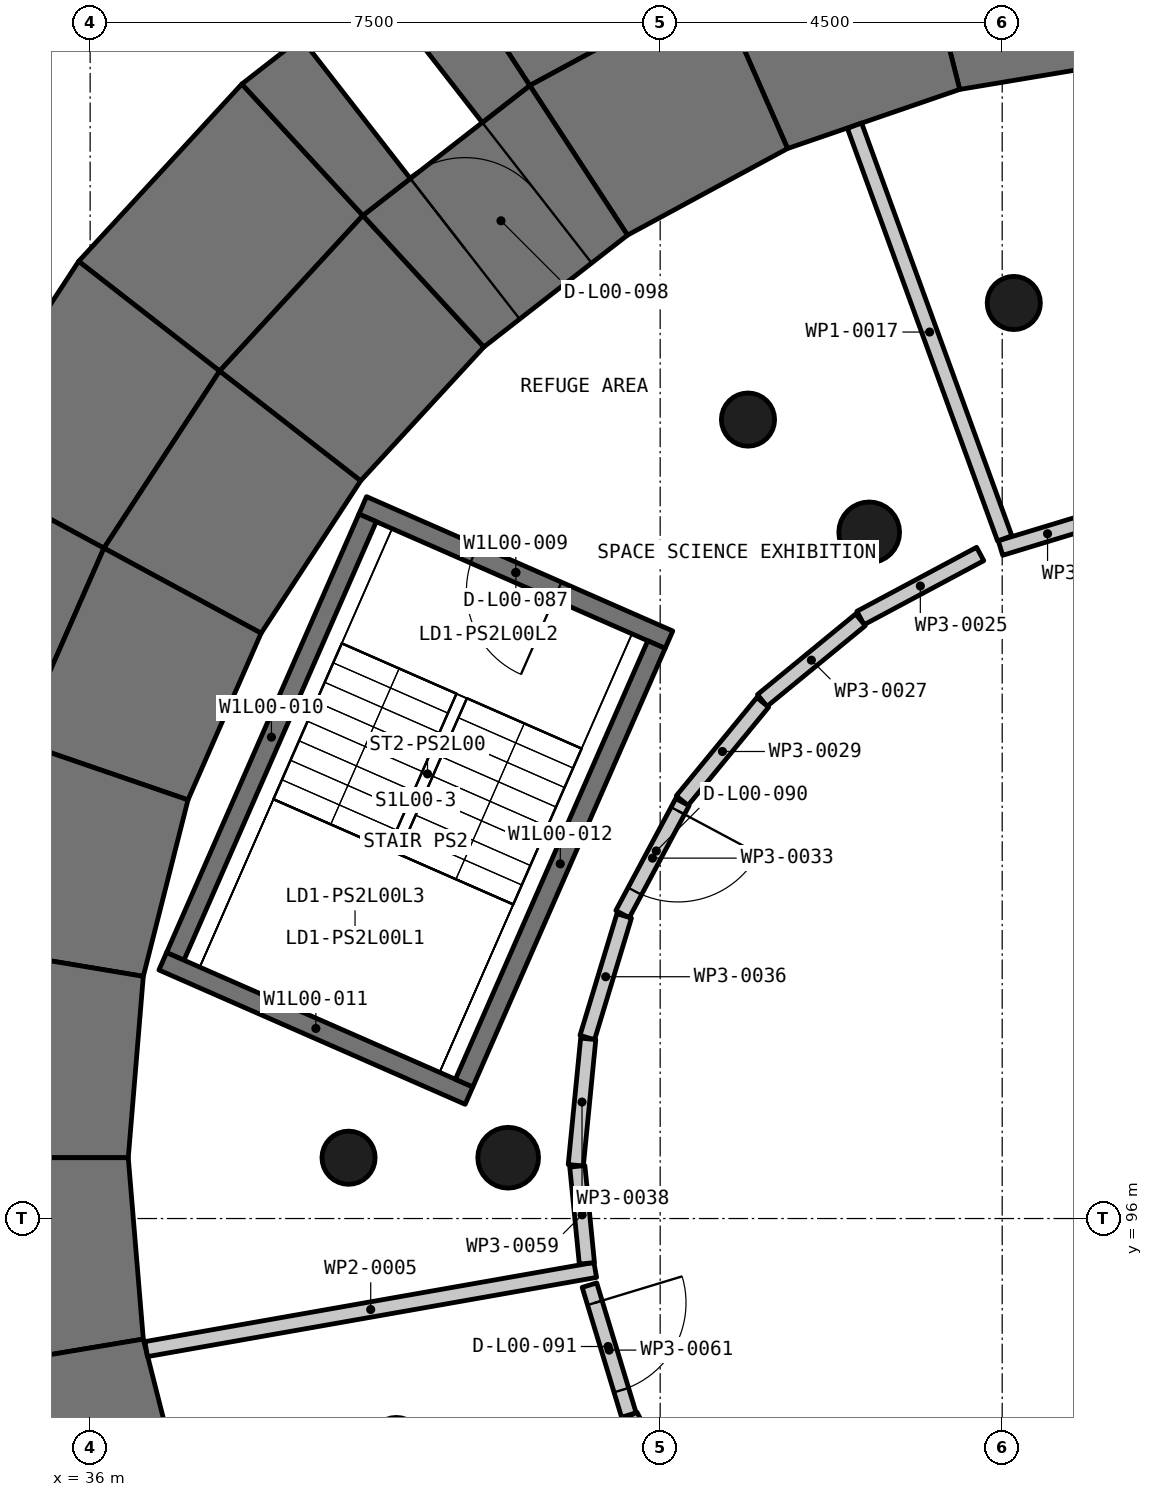
"""IFC4 building model, lengths in metres.
Left out: names, types, materials, properties, quantities, classifications, styles, units other than length and angle.
Written with IfcOpenShell. Run it as: python <this file> out.ifc"""

import sys

from ifc_helpers import new_model, si_unit, direction, frame, frame_2d, origin, origin_2d, place, context, subcontext, project, spatial, polyline, rectangle, circle, outline, extrude, element, fill, save


model = new_model("IFC4")
c1 = context("Model", 3, precision=1e-05, world=origin(), true_north=direction((0.0, 1.0)))
c2 = subcontext(c1, "Body", "Model", "MODEL_VIEW")
j1 = project(units=[si_unit("LENGTHUNIT", "METRE"), si_unit("PLANEANGLEUNIT", "RADIAN")], contexts=[c1])
p1 = place(None, origin())
s1 = spatial("IfcSite", under=j1, at=p1, CompositionType="ELEMENT")
p2 = place(p1, origin())
s2 = spatial("IfcBuilding", under=s1, at=p2, CompositionType="ELEMENT")
p3 = place(p2, origin())
s3 = spatial("IfcBuildingStorey", under=s2, at=p3, CompositionType="ELEMENT", Elevation=0.0)
for number, where, z_axis, x_axis in (
    (1, (46.25, 105.027, -0.2), (0.0, 0.0, 1.0), (1.0, 0.0, 0.0)),
    (2, (41.5, 96.8, -0.2), (0.0, 0.0, 1.0), (1.0, 0.0, 0.0)),
):
    element("IfcColumn", number, at=place(p3, frame(where, z_axis=z_axis, x_axis=x_axis)), inside=s3, PredefinedType="COLUMN", context=c2, shape_type="SweptSolid", body=[
        extrude(circle(Radius=0.4, at=origin_2d()), origin(), (0.0, 0.0, 1.0), 5.9),
    ])
for number, where, z_axis, x_axis in (
    (3, (48.152, 108.045, -0.2), (0.0, 0.0, 1.0), (1.0, 0.0, 0.0)),
    (4, (44.656, 106.511, -0.2), (0.0, 0.0, 1.0), (1.0, 0.0, 0.0)),
    (5, (39.4, 96.8, -0.2), (0.0, 0.0, 1.0), (1.0, 0.0, 0.0)),
    (6, (40.029, 93.033, -0.2), (0.0, 0.0, 1.0), (1.0, 0.0, 0.0)),
):
    element("IfcColumn", number, at=place(p3, frame(where, z_axis=z_axis, x_axis=x_axis)), inside=s3, PredefinedType="COLUMN", context=c2, shape_type="SweptSolid", body=[
        extrude(circle(Radius=0.35, at=origin_2d()), origin(), (0.0, 0.0, 1.0), 5.9),
    ])
p4 = place(p3, frame((43.845, 113.353, -0.2), z_axis=(0.0, 0.0, 1.0), x_axis=(-0.87946790064, -0.475958203778, 0.0)))
e7 = element("IfcWall", 7, at=p4, inside=s3, PredefinedType="SHEAR", context=c2, shape_type="SweptSolid", body=[
    extrude(outline(polyline([(0.0, -1.171), (3.171, -1.171), (2.977, 1.171), (0.194, 1.171), (0.0, -1.171)])), origin(), (0.0, 0.0, 1.0), 5.9),
])
p5 = place(p3, frame((38.858, 110.133, -0.2), z_axis=(0.0, 0.0, 1.0), x_axis=(-0.677243324002, -0.735759118254, 0.0)))
e8 = element("IfcWall", 8, at=p5, inside=s3, PredefinedType="SHEAR", context=c2, shape_type="SweptSolid", body=[
    extrude(outline(polyline([(0.0, -1.171), (3.171, -1.172), (2.977, 1.171), (0.194, 1.172), (0.0, -1.171)])), origin(), (0.0, 0.0, 1.0), 5.9),
])
p6 = place(p3, frame((36.829, 107.952, -0.2), z_axis=(0.0, 0.0, 1.0), x_axis=(-0.546965131946, -0.837155388464, 0.0)))
e9 = element("IfcWall", 9, at=p6, inside=s3, PredefinedType="SHEAR", context=c2, shape_type="SweptSolid", body=[
    extrude(outline(polyline([(0.0, -1.172), (3.171, -1.171), (2.977, 1.172), (0.194, 1.171), (0.0, -1.172)])), origin(), (0.0, 0.0, 1.0), 5.9),
])
p7 = place(p3, frame((35.187, 105.468, -0.2), z_axis=(0.0, 0.0, 1.0), x_axis=(-0.401683019395, -0.915778768006, 0.0)))
e10 = element("IfcWall", 10, at=p7, inside=s3, PredefinedType="SHEAR", context=c2, shape_type="SweptSolid", body=[
    extrude(outline(polyline([(-0.0, -1.171), (3.171, -1.171), (2.977, 1.171), (0.194, 1.171), (-0.0, -1.171)])), origin(), (0.0, 0.0, 1.0), 5.9),
])
p8 = place(p3, frame((49.802, 112.436, -0.2), z_axis=(0.0, 0.0, 1.0), x_axis=(-0.986348836235, -0.164669284498, 0.0)))
e11 = element("IfcWall", 11, at=p8, inside=s3, PredefinedType="SHEAR", context=c2, shape_type="SweptSolid", body=[
    extrude(outline(polyline([(0.0, -1.171), (2.783, -1.171), (2.589, 1.171), (0.194, 1.171), (0.0, -1.171)])), origin(), (0.0, 0.0, 1.0), 5.9),
])
p9 = place(p3, frame((47.244, 112.026, -0.2), z_axis=(0.0, 0.0, 1.0), x_axis=(-0.945820527965, -0.324689896485, 0.0)))
e12 = element("IfcWall", 12, at=p9, inside=s3, PredefinedType="SHEAR", context=c2, shape_type="SweptSolid", body=[
    extrude(outline(polyline([(0.0, -1.171), (2.783, -1.171), (2.589, 1.171), (0.194, 1.172), (0.0, -1.171)])), origin(), (0.0, 0.0, 1.0), 5.9),
])
p10 = place(p3, frame((44.789, 111.2, -0.2), z_axis=(0.0, 0.0, 1.0), x_axis=(-0.87946337705, -0.4759665623, 0.0)))
e13 = element("IfcWall", 13, at=p10, inside=s3, PredefinedType="SHEAR", context=c2, shape_type="SweptSolid", body=[
    extrude(outline(polyline([(0.0, -1.171), (2.783, -1.171), (2.589, 1.171), (0.194, 1.171), (0.0, -1.171)])), origin(), (0.0, 0.0, 1.0), 5.9),
])
p11 = place(p3, frame((40.45, 108.403, -0.2), z_axis=(0.0, 0.0, 1.0), x_axis=(-0.677288370304, -0.735717651991, 0.0)))
e14 = element("IfcWall", 14, at=p11, inside=s3, PredefinedType="SHEAR", context=c2, shape_type="SweptSolid", body=[
    extrude(outline(polyline([(0.0, -1.171), (2.783, -1.171), (2.588, 1.171), (0.194, 1.171), (0.0, -1.171)])), origin(), (0.0, 0.0, 1.0), 5.9),
])
p12 = place(p3, frame((38.684, 106.508, -0.2), z_axis=(0.0, 0.0, 1.0), x_axis=(-0.54694202516, -0.837170485095, 0.0)))
e15 = element("IfcWall", 15, at=p12, inside=s3, PredefinedType="SHEAR", context=c2, shape_type="SweptSolid", body=[
    extrude(outline(polyline([(0.0, -1.171), (2.783, -1.171), (2.589, 1.171), (0.194, 1.171), (0.0, -1.171)])), origin(), (0.0, 0.0, 1.0), 5.9),
])
p13 = place(p3, frame((37.254, 104.349, -0.2), z_axis=(0.0, 0.0, 1.0), x_axis=(-0.401729909484, -0.915758199431, 0.0)))
e16 = element("IfcWall", 16, at=p13, inside=s3, PredefinedType="SHEAR", context=c2, shape_type="SweptSolid", body=[
    extrude(outline(polyline([(0.0, -1.171), (2.783, -1.171), (2.588, 1.172), (0.194, 1.171), (0.0, -1.171)])), origin(), (0.0, 0.0, 1.0), 5.9),
])
p14 = place(p3, frame((36.199, 101.983, -0.2), z_axis=(0.0, 0.0, 1.0), x_axis=(-0.245548138537, -0.969384398297, 0.0)))
e17 = element("IfcWall", 17, at=p14, inside=s3, PredefinedType="SHEAR", context=c2, shape_type="SweptSolid", body=[
    extrude(outline(polyline([(0.0, -1.172), (2.783, -1.171), (2.589, 1.172), (0.194, 1.171), (0.0, -1.172)])), origin(), (0.0, 0.0, 1.0), 5.9),
])
p15 = place(p3, frame((35.548, 99.477, -0.2), z_axis=(0.0, 0.0, 1.0), x_axis=(-0.082558992404, -0.996586179301, 0.0)))
e18 = element("IfcWall", 18, at=p15, inside=s3, PredefinedType="SHEAR", context=c2, shape_type="SweptSolid", body=[
    extrude(outline(polyline([(0.0, -1.171), (2.783, -1.171), (2.589, 1.171), (0.194, 1.171), (0.0, -1.171)])), origin(), (0.0, 0.0, 1.0), 5.9),
])
p16 = place(p3, frame((35.318, 96.897, -0.2), z_axis=(0.0, 0.0, 1.0), x_axis=(0.082558992404, -0.996586179301, 0.0)))
e19 = element("IfcWall", 19, at=p16, inside=s3, PredefinedType="SHEAR", context=c2, shape_type="SweptSolid", body=[
    extrude(outline(polyline([(0.0, -1.171), (2.783, -1.171), (2.588, 1.171), (0.194, 1.171), (0.0, -1.171)])), origin(), (0.0, 0.0, 1.0), 5.9),
])
p17 = place(p3, frame((35.516, 94.314, -0.2), z_axis=(0.0, 0.0, 1.0), x_axis=(0.245569021983, -0.969379108214, 0.0)))
e20 = element("IfcWall", 20, at=p17, inside=s3, PredefinedType="SHEAR", context=c2, shape_type="SweptSolid", body=[
    extrude(outline(polyline([(0.0, -1.171), (2.783, -1.172), (2.589, 1.171), (0.194, 1.172), (0.0, -1.171)])), origin(), (0.0, 0.0, 1.0), 5.9),
])
p18 = place(p3, frame((43.616, 103.615, -0.2), z_axis=(0.0, 0.0, 1.0), x_axis=(-0.915768514631, 0.401706394785, 0.0)))
e21 = element("IfcWall", 21, at=p18, inside=s3, PredefinedType="SHEAR", context=c2, shape_type="SweptSolid", body=[
    extrude(rectangle(XDim=4.4, YDim=0.25, at=frame_2d((2.2, 0.0))), origin(), (0.0, 0.0, 1.0), 5.9),
])
p19 = place(p18, frame((1.6, 0.0, 0.2)))
e22 = element("IfcOpeningElement", 22, at=p19, cuts=e21, PredefinedType="OPENING", context=c2, shape_type="SweptSolid", body=[
    extrude(rectangle(XDim=1.2, YDim=2.2, at=frame_2d((0.6, 1.1))), frame((0.0, 0.135, 0.0), z_axis=(0.0, -1.0, 0.0), x_axis=(1.0, 0.0, 0.0)), (0.0, 0.0, 1.0), 0.27),
])
p20 = place(p3, frame((39.651, 105.218, -0.2), z_axis=(0.0, 0.0, 1.0), x_axis=(-0.401711100828, -0.915766450287, 0.0)))
e23 = element("IfcWall", 23, at=p20, inside=s3, PredefinedType="SHEAR", context=c2, shape_type="SweptSolid", body=[
    extrude(rectangle(XDim=6.3, YDim=0.25, at=frame_2d((3.15, 0.0))), origin(), (0.0, 0.0, 1.0), 5.9),
])
p21 = place(p3, frame((40.985, 97.617, -0.2), z_axis=(0.0, 0.0, 1.0), x_axis=(-0.915768514631, 0.401706394785, 0.0)))
e24 = element("IfcWall", 24, at=p21, inside=s3, PredefinedType="SHEAR", context=c2, shape_type="SweptSolid", body=[
    extrude(rectangle(XDim=4.4, YDim=0.25, at=frame_2d((2.2, 0.0))), origin(), (0.0, 0.0, 1.0), 5.9),
])
p22 = place(p3, frame((43.451, 103.551, -0.2), z_axis=(0.0, 0.0, 1.0), x_axis=(-0.401678600913, -0.915780706047, 0.0)))
e25 = element("IfcWall", 25, at=p22, inside=s3, PredefinedType="SHEAR", context=c2, shape_type="SweptSolid", body=[
    extrude(rectangle(XDim=6.3, YDim=0.25, at=frame_2d((3.15, 0.0))), origin(), (0.0, 0.0, 1.0), 5.9),
])
p23 = place(p3, frame((40.308, 108.272, -0.2), z_axis=(0.0, 0.0, 1.0), x_axis=(0.789144316107, 0.614207821797, 0.0)))
e26 = element("IfcWall", 26, at=p23, inside=s3, PredefinedType="SHEAR", context=c2, shape_type="SweptSolid", body=[
    extrude(outline(polyline([(2.783, 1.171), (0.0, 1.171), (0.194, -1.171), (2.589, -1.172), (2.783, 1.171)])), origin(), (0.0, 0.0, 1.0), 5.9),
])
p24 = place(p23, frame((0.791, 0.0, 0.2)))
e27 = element("IfcOpeningElement", 27, at=p24, cuts=e26, PredefinedType="OPENING", context=c2, shape_type="SweptSolid", body=[
    extrude(rectangle(XDim=1.2, YDim=2.2, at=frame_2d((0.6, 1.1))), frame((0.0, 1.181, 0.0), z_axis=(0.0, -1.0, 0.0), x_axis=(1.0, 0.0, 0.0)), (0.0, 0.0, 1.0), 2.363),
])
p25 = place(p3, frame((41.218, 111.949, -0.2), z_axis=(0.0, 0.0, 1.0), x_axis=(-0.789112096856, -0.614249215381, 0.0)))
e28 = element("IfcWall", 28, at=p25, inside=s3, PredefinedType="SHEAR", context=c2, shape_type="SweptSolid", body=[
    extrude(outline(polyline([(0.0, -1.171), (0.0, -1.171), (0.194, 1.172), (0.986, 1.172), (0.986, -1.171), (0.0, -1.171)])), origin(), (0.0, 0.0, 1.0), 5.9),
])
p26 = place(p3, frame((39.493, 110.607, -0.2), z_axis=(0.0, 0.0, 1.0), x_axis=(-0.789138708644, -0.614215026289, 0.0)))
e29 = element("IfcWall", 29, at=p26, inside=s3, PredefinedType="SHEAR", context=c2, shape_type="SweptSolid", body=[
    extrude(outline(polyline([(0.791, 1.171), (0.985, -1.171), (0.0, -1.171), (0.0, 1.172), (0.791, 1.171)])), origin(), (0.0, 0.0, 1.0), 5.9),
])
p27 = place(p3, frame((36.737, 94.282, 0.0), z_axis=(0.0, 0.0, 1.0), x_axis=(0.984809765879, 0.173636761746, 0.0)))
e30 = element("IfcWall", 30, at=p27, inside=s3, PredefinedType="PARTITIONING", context=c2, shape_type="SweptSolid", body=[
    extrude(rectangle(XDim=6.0, YDim=0.2, at=frame_2d((3.0, 0.0))), origin(), (0.0, 0.0, 1.0), 4.8),
])
p28 = place(p3, frame((47.978, 104.821, 0.0), z_axis=(0.0, 0.0, 1.0), x_axis=(0.956954542429, 0.290237839924, 0.0)))
e31 = element("IfcWall", 31, at=p28, inside=s3, PredefinedType="PARTITIONING", context=c2, shape_type="SweptSolid", body=[
    extrude(rectangle(XDim=1.294, YDim=0.2, at=frame_2d((0.647, 0.0))), origin(), (0.0, 0.0, 1.0), 4.8),
])
p29 = place(p3, frame((46.135, 103.901, 0.0), z_axis=(0.0, 0.0, 1.0), x_axis=(0.881871891498, 0.471489095299, 0.0)))
e32 = element("IfcWall", 32, at=p29, inside=s3, PredefinedType="PARTITIONING", context=c2, shape_type="SweptSolid", body=[
    extrude(rectangle(XDim=1.786, YDim=0.2, at=frame_2d((0.893, 0.0))), origin(), (0.0, 0.0, 1.0), 4.8),
])
p30 = place(p3, frame((44.843, 102.816, 0.0), z_axis=(0.0, 0.0, 1.0), x_axis=(0.772999913958, 0.634406126248, 0.0)))
e33 = element("IfcWall", 33, at=p30, inside=s3, PredefinedType="PARTITIONING", context=c2, shape_type="SweptSolid", body=[
    extrude(rectangle(XDim=1.672, YDim=0.2, at=frame_2d((0.836, 0.0))), origin(), (0.0, 0.0, 1.0), 4.8),
])
p31 = place(p3, frame((43.789, 101.498, 0.0), z_axis=(0.0, 0.0, 1.0), x_axis=(0.634421768811, 0.772987075739, 0.0)))
e34 = element("IfcWall", 34, at=p31, inside=s3, PredefinedType="PARTITIONING", context=c2, shape_type="SweptSolid", body=[
    extrude(rectangle(XDim=1.672, YDim=0.2, at=frame_2d((0.836, 0.0))), origin(), (0.0, 0.0, 1.0), 4.8),
])
p32 = place(p3, frame((43.793, 101.479, 0.0), z_axis=(0.0, 0.0, 1.0), x_axis=(-0.471467367282, -0.881883507946, 0.0)))
e35 = element("IfcWall", 35, at=p32, inside=s3, PredefinedType="PARTITIONING", context=c2, shape_type="SweptSolid", body=[
    extrude(rectangle(XDim=1.672, YDim=0.2, at=frame_2d((0.836, 0.0))), origin(), (0.0, 0.0, 1.0), 4.8),
])
p33 = place(p32, frame((0.129, 0.0, 0.0)))
e36 = element("IfcOpeningElement", 36, at=p33, cuts=e35, PredefinedType="OPENING", context=c2, shape_type="SweptSolid", body=[
    extrude(rectangle(XDim=1.2, YDim=2.1, at=frame_2d((0.6, 1.05))), frame((0.0, 0.11, 0.0), z_axis=(0.0, -1.0, 0.0), x_axis=(1.0, 0.0, 0.0)), (0.0, 0.0, 1.0), 0.22),
])
p34 = place(p3, frame((42.541, 98.381, 0.0), z_axis=(0.0, 0.0, 1.0), x_axis=(0.2902382352, 0.956954422545, 0.0)))
e37 = element("IfcWall", 37, at=p34, inside=s3, PredefinedType="PARTITIONING", context=c2, shape_type="SweptSolid", body=[
    extrude(rectangle(XDim=1.673, YDim=0.2, at=frame_2d((0.836, 0.0))), origin(), (0.0, 0.0, 1.0), 4.8),
])
p35 = place(p3, frame((42.39, 96.7, 0.0), z_axis=(0.0, 0.0, 1.0), x_axis=(0.097999721553, 0.995186442118, 0.0)))
e38 = element("IfcWall", 38, at=p35, inside=s3, PredefinedType="PARTITIONING", context=c2, shape_type="SweptSolid", body=[
    extrude(rectangle(XDim=1.672, YDim=0.2, at=frame_2d((0.836, 0.0))), origin(), (0.0, 0.0, 1.0), 4.8),
])
p36 = place(p3, frame((42.536, 95.41, 0.0), z_axis=(0.0, 0.0, 1.0), x_axis=(-0.097996402677, 0.995186768935, 0.0)))
e39 = element("IfcWall", 39, at=p36, inside=s3, PredefinedType="PARTITIONING", context=c2, shape_type="SweptSolid", body=[
    extrude(rectangle(XDim=1.283, YDim=0.2, at=frame_2d((0.642, 0.0))), origin(), (0.0, 0.0, 1.0), 4.8),
])
p37 = place(p3, frame((42.57, 95.124, 0.0), z_axis=(0.0, 0.0, 1.0), x_axis=(0.290356433396, -0.956918565807, 0.0)))
e40 = element("IfcWall", 40, at=p37, inside=s3, PredefinedType="PARTITIONING", context=c2, shape_type="SweptSolid", body=[
    extrude(rectangle(XDim=1.786, YDim=0.2, at=frame_2d((0.893, 0.0))), origin(), (0.0, 0.0, 1.0), 4.8),
])
p38 = place(p37, frame((0.244, 0.0, 0.0)))
e41 = element("IfcOpeningElement", 41, at=p38, cuts=e40, PredefinedType="OPENING", context=c2, shape_type="SweptSolid", body=[
    extrude(rectangle(XDim=1.2, YDim=2.1, at=frame_2d((0.6, 1.05))), frame((0.0, 0.11, 0.0), z_axis=(0.0, -1.0, 0.0), x_axis=(1.0, 0.0, 0.0)), (0.0, 0.0, 1.0), 0.22),
])
p39 = place(p3, frame((48.033, 104.948, 0.0), z_axis=(0.0, 0.0, 1.0), x_axis=(-0.342007679722, 0.939697157073, 0.0)))
e42 = element("IfcWall", 42, at=p39, inside=s3, PredefinedType="PARTITIONING", context=c2, shape_type="SweptSolid", body=[
    extrude(rectangle(XDim=5.778, YDim=0.2, at=frame_2d((2.889, 0.0))), origin(), (0.0, 0.0, 1.0), 4.8),
])
p40 = place(p3, frame((43.894, 91.932, 0.0), z_axis=(0.0, 0.0, 1.0), x_axis=(-0.471528100867, 0.881851036226, 0.0)))
e43 = element("IfcWall", 43, at=p40, inside=s3, PredefinedType="PARTITIONING", context=c2, shape_type="SweptSolid", body=[
    extrude(rectangle(XDim=1.671, YDim=0.2, at=frame_2d((0.836, 0.0))), origin(), (0.0, 0.0, 1.0), 4.8),
])
p41 = place(p24, origin())
e44 = element("IfcDoor", 44, at=p41, inside=s3, OperationType="SINGLE_SWING_LEFT", PredefinedType="DOOR", context=c2, shape_type="SweptSolid", body=[
    extrude(rectangle(XDim=1.2, YDim=2.2, at=frame_2d((0.6, 1.1))), frame((0.0, 0.025, 0.0), z_axis=(0.0, -1.0, 0.0), x_axis=(1.0, 0.0, 0.0)), (0.0, 0.0, 1.0), 0.05),
])
fill(e27, e44)
p42 = place(p19, origin())
e45 = element("IfcDoor", 45, at=p42, inside=s3, OperationType="SINGLE_SWING_LEFT", PredefinedType="DOOR", context=c2, shape_type="SweptSolid", body=[
    extrude(rectangle(XDim=1.2, YDim=2.2, at=frame_2d((0.6, 1.1))), frame((0.0, 0.025, 0.0), z_axis=(0.0, -1.0, 0.0), x_axis=(1.0, 0.0, 0.0)), (0.0, 0.0, 1.0), 0.05),
])
fill(e22, e45)
p43 = place(p33, origin())
e46 = element("IfcDoor", 46, at=p43, inside=s3, OperationType="SINGLE_SWING_RIGHT", PredefinedType="DOOR", context=c2, shape_type="SweptSolid", body=[
    extrude(rectangle(XDim=1.2, YDim=2.1, at=frame_2d((0.6, 1.05))), frame((0.0, 0.025, 0.0), z_axis=(0.0, -1.0, 0.0), x_axis=(1.0, 0.0, 0.0)), (0.0, 0.0, 1.0), 0.05),
])
fill(e36, e46)
p44 = place(p38, origin())
e47 = element("IfcDoor", 47, at=p44, inside=s3, OperationType="SINGLE_SWING_RIGHT", PredefinedType="DOOR", context=c2, shape_type="SweptSolid", body=[
    extrude(rectangle(XDim=1.2, YDim=2.1, at=frame_2d((0.6, 1.05))), frame((0.0, 0.025, 0.0), z_axis=(0.0, -1.0, 0.0), x_axis=(1.0, 0.0, 0.0)), (0.0, 0.0, 1.0), 0.05),
])
fill(e41, e47)
save(model, sys.argv[1])
